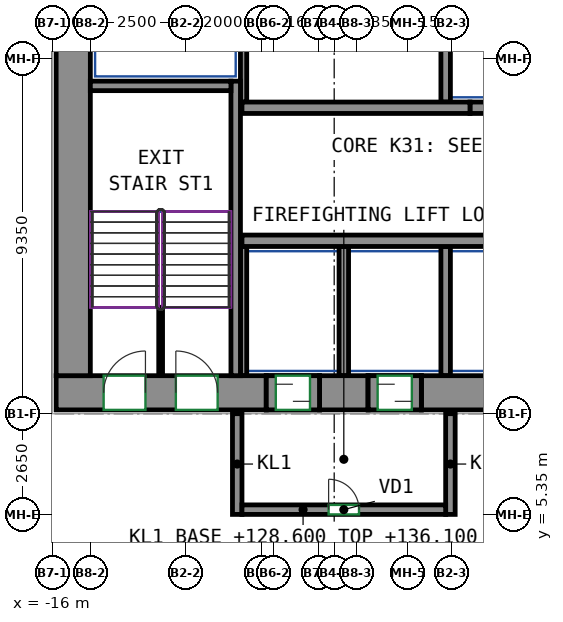
"""IFC4 building model, lengths in metres.
Left out: names, types, materials, properties, quantities, classifications, styles, units other than length and angle.
Written with IfcOpenShell. Run it as: python <this file> out.ifc"""

import sys

from ifc_helpers import new_model, si_unit, direction, frame, frame_2d, origin, place, context, subcontext, project, spatial, rectangle, extrude, source, transform, mapped, element, fill, save


model = new_model("IFC4")
c1 = context("Model", 3, precision=1e-05, world=origin(), true_north=direction((0.0, 1.0)))
c2 = subcontext(c1, "Body", "Model", "MODEL_VIEW")
j1 = project(units=[si_unit("LENGTHUNIT", "METRE"), si_unit("PLANEANGLEUNIT", "RADIAN")], contexts=[c1])
p1 = place(None, origin())
s1 = spatial("IfcSite", under=j1, at=p1, CompositionType="ELEMENT")
p2 = place(p1, origin())
s2 = spatial("IfcBuilding", under=s1, at=p2, CompositionType="ELEMENT")
p3 = place(p2, frame((0.0, 0.0, 128.6)))
s3 = spatial("IfcBuildingStorey", under=s2, at=p3, CompositionType="ELEMENT", Elevation=128.6)
m1 = source(origin(), c2, "Body", "SweptSolid", [
    extrude(rectangle(XDim=5.53, YDim=0.9, at=frame_2d((2.765, 0.0))), origin(), (0.0, 0.0, 1.0), 9.5),
])
p4 = place(p3, frame((-15.9, 8.55, 0.0), z_axis=(0.0, 0.0, 1.0), x_axis=(1.0, 0.0, 0.0)))
e1 = element("IfcWall", 1, at=p4, inside=s3, PredefinedType="SHEAR", context=c2, shape_type="MappedRepresentation", body=[
    mapped(m1, transform((0.0, 0.0, 0.0))),
])
p5 = place(p4, frame((1.25, 0.0, 0.0)))
e2 = element("IfcOpeningElement", 2, at=p5, cuts=e1, PredefinedType="OPENING", context=c2, shape_type="SweptSolid", body=[
    extrude(rectangle(XDim=1.1, YDim=2.1, at=frame_2d((0.55, 1.05))), frame((0.0, 0.46, 0.0), z_axis=(0.0, -1.0, 0.0), x_axis=(1.0, 0.0, 0.0)), (0.0, 0.0, 1.0), 0.92),
])
p6 = place(p4, frame((3.15, 0.0, 0.0)))
e3 = element("IfcOpeningElement", 3, at=p6, cuts=e1, PredefinedType="OPENING", context=c2, shape_type="SweptSolid", body=[
    extrude(rectangle(XDim=1.1, YDim=2.1, at=frame_2d((0.55, 1.05))), frame((0.0, 0.46, 0.0), z_axis=(0.0, -1.0, 0.0), x_axis=(1.0, 0.0, 0.0)), (0.0, 0.0, 1.0), 0.92),
])
m2 = source(origin(), c2, "Body", "SweptSolid", [
    extrude(rectangle(XDim=1.28, YDim=0.9, at=frame_2d((0.64, 0.0))), origin(), (0.0, 0.0, 1.0), 9.5),
])
p7 = place(p3, frame((-8.97, 8.55, 0.0), z_axis=(0.0, 0.0, 1.0), x_axis=(1.0, 0.0, 0.0)))
e4 = element("IfcWall", 4, at=p7, inside=s3, PredefinedType="SHEAR", context=c2, shape_type="MappedRepresentation", body=[
    mapped(m2, transform((0.0, 0.0, 0.0))),
])
m3 = source(origin(), c2, "Body", "SweptSolid", [
    extrude(rectangle(XDim=14.18, YDim=0.9, at=frame_2d((7.09, 0.0))), origin(), (0.0, 0.0, 1.0), 9.5),
])
p8 = place(p3, frame((-6.29, 8.55, 0.0), z_axis=(0.0, 0.0, 1.0), x_axis=(1.0, 0.0, 0.0)))
e5 = element("IfcWall", 5, at=p8, inside=s3, PredefinedType="SHEAR", context=c2, shape_type="MappedRepresentation", body=[
    mapped(m3, transform((0.0, 0.0, 0.0))),
])
m4 = source(origin(), c2, "Body", "SweptSolid", [
    extrude(rectangle(XDim=12.0, YDim=0.9, at=frame_2d((6.0, 0.0))), origin(), (0.0, 0.0, 1.0), 9.5),
])
p9 = place(p3, frame((-15.45, 9.0, 0.0), z_axis=(0.0, 0.0, 1.0), x_axis=(0.0, 1.0, 0.0)))
e6 = element("IfcWall", 6, at=p9, inside=s3, PredefinedType="SHEAR", context=c2, shape_type="MappedRepresentation", body=[
    mapped(m4, transform((0.0, 0.0, 0.0))),
])
m5 = source(origin(), c2, "Body", "SweptSolid", [
    extrude(rectangle(XDim=7.75, YDim=0.25, at=frame_2d((3.875, 0.0))), origin(), (0.0, 0.0, 1.0), 9.5),
])
p10 = place(p3, frame((-11.175, 9.0, 0.0), z_axis=(0.0, 0.0, 1.0), x_axis=(0.0, 1.0, 0.0)))
e7 = element("IfcWall", 7, at=p10, inside=s3, PredefinedType="SHEAR", context=c2, shape_type="MappedRepresentation", body=[
    mapped(m5, transform((0.0, 0.0, 0.0))),
])
m6 = source(origin(), c2, "Body", "SweptSolid", [
    extrude(rectangle(XDim=3.7, YDim=0.25, at=frame_2d((1.85, 0.0))), origin(), (0.0, 0.0, 1.0), 9.5),
])
p11 = place(p3, frame((-15.0, 16.625, 0.0), z_axis=(0.0, 0.0, 1.0), x_axis=(1.0, 0.0, 0.0)))
e8 = element("IfcWall", 8, at=p11, inside=s3, PredefinedType="SHEAR", context=c2, shape_type="MappedRepresentation", body=[
    mapped(m6, transform((0.0, 0.0, 0.0))),
])
m7 = source(origin(), c2, "Body", "SweptSolid", [
    extrude(rectangle(XDim=18.9, YDim=0.3, at=frame_2d((9.45, 0.0))), origin(), (0.0, 0.0, 1.0), 9.5),
])
p12 = place(p3, frame((-11.01, 12.55, 0.0), z_axis=(0.0, 0.0, 1.0), x_axis=(1.0, 0.0, 0.0)))
e9 = element("IfcWall", 9, at=p12, inside=s3, PredefinedType="SHEAR", context=c2, shape_type="MappedRepresentation", body=[
    mapped(m7, transform((0.0, 0.0, 0.0))),
])
m8 = source(origin(), c2, "Body", "SweptSolid", [
    extrude(rectangle(XDim=6.0, YDim=0.3, at=frame_2d((3.0, 0.0))), origin(), (0.0, 0.0, 1.0), 9.5),
])
p13 = place(p3, frame((-11.01, 16.05, 0.0), z_axis=(0.0, 0.0, 1.0), x_axis=(1.0, 0.0, 0.0)))
e10 = element("IfcWall", 10, at=p13, inside=s3, PredefinedType="SHEAR", context=c2, shape_type="MappedRepresentation", body=[
    mapped(m8, transform((0.0, 0.0, 0.0))),
])
m9 = source(origin(), c2, "Body", "SweptSolid", [
    extrude(rectangle(XDim=1.4, YDim=0.9, at=frame_2d((0.7, 0.0))), origin(), (0.0, 0.0, 1.0), 5.6),
])
p14 = place(p3, frame((-10.37, 8.55, 3.9), z_axis=(0.0, 0.0, 1.0), x_axis=(1.0, 0.0, 0.0)))
e11 = element("IfcWall", 11, at=p14, inside=s3, PredefinedType="SHEAR", context=c2, shape_type="MappedRepresentation", body=[
    mapped(m9, transform((0.0, 0.0, 0.0))),
])
m10 = source(origin(), c2, "Body", "SweptSolid", [
    extrude(rectangle(XDim=1.4, YDim=0.9, at=frame_2d((0.7, 0.0))), origin(), (0.0, 0.0, 1.0), 5.55),
])
p15 = place(p3, frame((-7.69, 8.55, 3.95), z_axis=(0.0, 0.0, 1.0), x_axis=(1.0, 0.0, 0.0)))
e12 = element("IfcWall", 12, at=p15, inside=s3, PredefinedType="SHEAR", context=c2, shape_type="MappedRepresentation", body=[
    mapped(m10, transform((0.0, 0.0, 0.0))),
])
m11 = source(origin(), c2, "Body", "SweptSolid", [
    extrude(rectangle(XDim=1.4, YDim=0.3, at=frame_2d((0.7, 0.0))), origin(), (0.0, 0.0, 1.0), 9.5),
])
p16 = place(p3, frame((-5.01, 16.05, 0.0), z_axis=(0.0, 0.0, 1.0), x_axis=(1.0, 0.0, 0.0)))
e13 = element("IfcWall", 13, at=p16, inside=s3, PredefinedType="PARTITIONING", context=c2, shape_type="MappedRepresentation", body=[
    mapped(m11, transform((0.0, 0.0, 0.0))),
])
m12 = source(origin(), c2, "Body", "SweptSolid", [
    extrude(rectangle(XDim=2.65, YDim=0.25, at=frame_2d((1.325, 0.0))), origin(), (0.0, 0.0, 1.0), 9.5),
])
for number, where, z_axis, x_axis in (
    (14, (-11.135, 5.35, 0.0), (0.0, 0.0, 1.0), (0.0, 1.0, 0.0)),
    (15, (-5.525, 5.35, 0.0), (0.0, 0.0, 1.0), (0.0, 1.0, 0.0)),
):
    element("IfcWall", number, at=place(p3, frame(where, z_axis=z_axis, x_axis=x_axis)), inside=s3, PredefinedType="PARTITIONING", context=c2, shape_type="MappedRepresentation", body=[
        mapped(m12, transform((0.0, 0.0, 0.0))),
    ])
m13 = source(origin(), c2, "Body", "SweptSolid", [
    extrude(rectangle(XDim=5.36, YDim=0.25, at=frame_2d((2.68, 0.0))), origin(), (0.0, 0.0, 1.0), 7.5),
])
p17 = place(p3, frame((-11.01, 5.475, 0.0), z_axis=(0.0, 0.0, 1.0), x_axis=(1.0, 0.0, 0.0)))
e16 = element("IfcWall", 16, at=p17, inside=s3, PredefinedType="PARTITIONING", context=c2, shape_type="MappedRepresentation", body=[
    mapped(m13, transform((0.0, 0.0, 0.0))),
])
p18 = place(p17, frame((2.28, 0.0, 0.0)))
e17 = element("IfcOpeningElement", 17, at=p18, cuts=e16, PredefinedType="OPENING", context=c2, shape_type="SweptSolid", body=[
    extrude(rectangle(XDim=0.8, YDim=2.0, at=frame_2d((0.4, 1.0))), frame((0.0, 0.135, 0.0), z_axis=(0.0, -1.0, 0.0), x_axis=(1.0, 0.0, 0.0)), (0.0, 0.0, 1.0), 0.27),
])
m14 = source(origin(), c2, "Body", "SweptSolid", [
    extrude(rectangle(XDim=4.8, YDim=0.165, at=frame_2d((2.4, 0.0))), origin(), (0.0, 0.0, 1.0), 9.5),
])
p19 = place(p3, frame((-10.968, 16.2, 0.0), z_axis=(0.0, 0.0, 1.0), x_axis=(0.0, 1.0, 0.0)))
e18 = element("IfcWall", 18, at=p19, inside=s3, PredefinedType="PARTITIONING", context=c2, shape_type="MappedRepresentation", body=[
    mapped(m14, transform((0.0, 0.0, 0.0))),
])
m15 = source(origin(), c2, "Body", "SweptSolid", [
    extrude(rectangle(XDim=3.275, YDim=0.25, at=frame_2d((1.638, 0.0))), origin(), (0.0, 0.0, 1.0), 9.5),
])
p20 = place(p3, frame((-5.65, 16.2, 0.0), z_axis=(0.0, 0.0, 1.0), x_axis=(0.0, 1.0, 0.0)))
e19 = element("IfcWall", 19, at=p20, inside=s3, PredefinedType="PARTITIONING", context=c2, shape_type="MappedRepresentation", body=[
    mapped(m15, transform((0.0, 0.0, 0.0))),
])
m16 = source(origin(), c2, "Body", "SweptSolid", [
    extrude(rectangle(XDim=3.4, YDim=0.165, at=frame_2d((1.7, 0.0))), origin(), (0.0, 0.0, 1.0), 9.5),
])
p21 = place(p3, frame((-10.968, 9.0, 0.0), z_axis=(0.0, 0.0, 1.0), x_axis=(0.0, 1.0, 0.0)))
e20 = element("IfcWall", 20, at=p21, inside=s3, PredefinedType="PARTITIONING", context=c2, shape_type="MappedRepresentation", body=[
    mapped(m16, transform((0.0, 0.0, 0.0))),
])
m17 = source(origin(), c2, "Body", "SweptSolid", [
    extrude(rectangle(XDim=3.4, YDim=0.25, at=frame_2d((1.7, 0.0))), origin(), (0.0, 0.0, 1.0), 9.5),
])
for number, where, z_axis, x_axis in (
    (21, (-5.65, 9.0, 0.0), (0.0, 0.0, 1.0), (0.0, 1.0, 0.0)),
    (22, (-8.33, 9.0, 0.0), (0.0, 0.0, 1.0), (0.0, 1.0, 0.0)),
):
    element("IfcWall", number, at=place(p3, frame(where, z_axis=z_axis, x_axis=x_axis)), inside=s3, PredefinedType="PARTITIONING", context=c2, shape_type="MappedRepresentation", body=[
        mapped(m17, transform((0.0, 0.0, 0.0))),
    ])
m18 = source(origin(), c2, "Body", "SweptSolid", [
    extrude(rectangle(XDim=1.4, YDim=0.9, at=frame_2d((0.7, 0.0))), origin(), (0.0, 0.0, 1.0), 2.7),
])
p22 = place(p3, frame((-10.37, 8.55, 0.0), z_axis=(0.0, 0.0, 1.0), x_axis=(1.0, 0.0, 0.0)))
e23 = element("IfcWall", 23, at=p22, inside=s3, PredefinedType="PARTITIONING", context=c2, shape_type="MappedRepresentation", body=[
    mapped(m18, transform((0.0, 0.0, 0.0))),
])
p23 = place(p22, frame((0.25, 0.0, 0.0)))
e24 = element("IfcOpeningElement", 24, at=p23, cuts=e23, PredefinedType="OPENING", context=c2, shape_type="SweptSolid", body=[
    extrude(rectangle(XDim=0.9, YDim=2.1, at=frame_2d((0.45, 1.05))), frame((0.0, 0.46, 0.0), z_axis=(0.0, -1.0, 0.0), x_axis=(1.0, 0.0, 0.0)), (0.0, 0.0, 1.0), 0.92),
])
m19 = source(origin(), c2, "Body", "SweptSolid", [
    extrude(rectangle(XDim=1.4, YDim=0.9, at=frame_2d((0.7, 0.0))), origin(), (0.0, 0.0, 1.0), 2.7),
])
p24 = place(p3, frame((-7.69, 8.55, 0.0), z_axis=(0.0, 0.0, 1.0), x_axis=(1.0, 0.0, 0.0)))
e25 = element("IfcWall", 25, at=p24, inside=s3, PredefinedType="PARTITIONING", context=c2, shape_type="MappedRepresentation", body=[
    mapped(m19, transform((0.0, 0.0, 0.0))),
])
p25 = place(p24, frame((0.25, 0.0, 0.0)))
e26 = element("IfcOpeningElement", 26, at=p25, cuts=e25, PredefinedType="OPENING", context=c2, shape_type="SweptSolid", body=[
    extrude(rectangle(XDim=0.9, YDim=2.1, at=frame_2d((0.45, 1.05))), frame((0.0, 0.46, 0.0), z_axis=(0.0, -1.0, 0.0), x_axis=(1.0, 0.0, 0.0)), (0.0, 0.0, 1.0), 0.92),
])
m20 = source(origin(), c2, "Body", "SweptSolid", [
    extrude(rectangle(XDim=1.8, YDim=0.1, at=frame_2d((0.9, 0.0))), origin(), (0.0, 0.0, 1.0), 3.1),
])
p26 = place(p3, frame((-13.15, 9.0, 0.0), z_axis=(0.0, 0.0, 1.0), x_axis=(0.0, 1.0, 0.0)))
e27 = element("IfcWall", 27, at=p26, inside=s3, PredefinedType="PARTITIONING", context=c2, shape_type="MappedRepresentation", body=[
    mapped(m20, transform((0.0, 0.0, 0.0))),
])
p27 = place(p18, origin())
e28 = element("IfcDoor", 28, at=p27, inside=s3, OperationType="SINGLE_SWING_LEFT", PredefinedType="DOOR", context=c2, shape_type="SweptSolid", body=[
    extrude(rectangle(XDim=0.8, YDim=2.0, at=frame_2d((0.4, 1.0))), frame((0.0, 0.025, 0.0), z_axis=(0.0, -1.0, 0.0), x_axis=(1.0, 0.0, 0.0)), (0.0, 0.0, 1.0), 0.05),
])
fill(e17, e28)
p28 = place(p23, origin())
e29 = element("IfcDoor", 29, at=p28, inside=s3, OperationType="SLIDING_TO_LEFT", PredefinedType="DOOR", context=c2, shape_type="SweptSolid", body=[
    extrude(rectangle(XDim=0.9, YDim=2.1, at=frame_2d((0.45, 1.05))), frame((0.0, 0.355, 0.0), z_axis=(0.0, -1.0, 0.0), x_axis=(1.0, 0.0, 0.0)), (0.0, 0.0, 1.0), 0.05),
])
fill(e24, e29)
p29 = place(p25, origin())
e30 = element("IfcDoor", 30, at=p29, inside=s3, OperationType="SLIDING_TO_RIGHT", PredefinedType="DOOR", context=c2, shape_type="SweptSolid", body=[
    extrude(rectangle(XDim=0.9, YDim=2.1, at=frame_2d((0.45, 1.05))), frame((0.0, 0.355, 0.0), z_axis=(0.0, -1.0, 0.0), x_axis=(1.0, 0.0, 0.0)), (0.0, 0.0, 1.0), 0.05),
])
fill(e26, e30)
p30 = place(p5, origin())
e31 = element("IfcDoor", 31, at=p30, inside=s3, OperationType="SINGLE_SWING_RIGHT", PredefinedType="DOOR", context=c2, shape_type="SweptSolid", body=[
    extrude(rectangle(XDim=1.1, YDim=2.1, at=frame_2d((0.55, 1.05))), frame((0.0, 0.355, 0.0), z_axis=(0.0, -1.0, 0.0), x_axis=(1.0, 0.0, 0.0)), (0.0, 0.0, 1.0), 0.05),
])
fill(e2, e31)
p31 = place(p6, origin())
e32 = element("IfcDoor", 32, at=p31, inside=s3, OperationType="SINGLE_SWING_LEFT", PredefinedType="DOOR", context=c2, shape_type="SweptSolid", body=[
    extrude(rectangle(XDim=1.1, YDim=2.1, at=frame_2d((0.55, 1.05))), frame((0.0, 0.355, 0.0), z_axis=(0.0, -1.0, 0.0), x_axis=(1.0, 0.0, 0.0)), (0.0, 0.0, 1.0), 0.05),
])
fill(e3, e32)
save(model, sys.argv[1])
